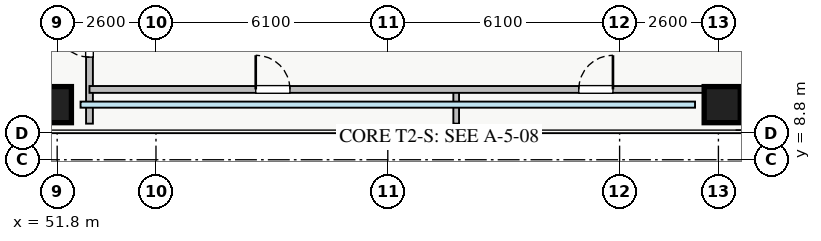
"""IFC4 building model, lengths in metres.
Left out: names, types, materials, properties, quantities, classifications, styles, units other than length and angle.
Written with IfcOpenShell. Run it as: python <this file> out.ifc"""

import sys

from ifc_helpers import new_model, si_unit, direction, frame, frame_2d, origin, origin_2d, place, context, subcontext, project, spatial, rectangle, extrude, source, transform, mapped, element, fill, save


model = new_model("IFC4")
c1 = context("Model", 3, precision=1e-05, world=origin(), true_north=direction((0.0, 1.0)))
c2 = subcontext(c1, "Body", "Model", "MODEL_VIEW")
j1 = project(units=[si_unit("LENGTHUNIT", "METRE"), si_unit("PLANEANGLEUNIT", "RADIAN")], contexts=[c1])
p1 = place(None, origin())
s1 = spatial("IfcSite", under=j1, at=p1, CompositionType="ELEMENT")
p2 = place(p1, origin())
s2 = spatial("IfcBuilding", under=s1, at=p2, CompositionType="ELEMENT")
p3 = place(p2, frame((0.0, 0.0, 39.25)))
s3 = spatial("IfcBuildingStorey", under=s2, at=p3, CompositionType="ELEMENT", Elevation=39.25)
m1 = source(origin(), c2, "Body", "SweptSolid", [
    extrude(rectangle(XDim=0.95, YDim=0.95, at=origin_2d()), origin(), (0.0, 0.0, 1.0), 3.25),
])
for number, where, z_axis, x_axis in (
    (1, (51.7, 10.25, 0.0), (0.0, 0.0, 1.0), (1.0, 0.0, 0.0)),
    (2, (69.3, 10.25, 0.0), (0.0, 0.0, 1.0), (1.0, 0.0, 0.0)),
):
    element("IfcColumn", number, at=place(p3, frame(where, z_axis=z_axis, x_axis=x_axis)), inside=s3, PredefinedType="COLUMN", context=c2, shape_type="MappedRepresentation", body=[
        mapped(m1, transform((0.0, 0.0, 0.0), x_axis=(1.0, 0.0, 0.0), y_axis=(0.0, 1.0, 0.0), z_axis=(0.0, 0.0, 1.0), scale=1.0)),
    ])
p4 = place(p3, frame((52.65, 9.75, 0.0), z_axis=(0.0, 0.0, 1.0), x_axis=(0.0, 1.0, 0.0)))
e3 = element("IfcWall", 3, at=p4, inside=s3, PredefinedType="PARTITIONING", context=c2, shape_type="SweptSolid", body=[
    extrude(rectangle(XDim=26.5, YDim=0.18, at=frame_2d((13.25, 0.0))), origin(), (0.0, 0.0, 1.0), 3.07),
])
p5 = place(p4, frame((23.85, 0.0, 0.0)))
e4 = element("IfcOpeningElement", 4, at=p5, cuts=e3, PredefinedType="OPENING", context=c2, shape_type="SweptSolid", body=[
    extrude(rectangle(XDim=0.9, YDim=2.05, at=frame_2d((0.45, 1.025))), frame((0.0, 0.1, 0.0), z_axis=(0.0, -1.0, 0.0), x_axis=(1.0, 0.0, 0.0)), (0.0, 0.0, 1.0), 0.2),
])
p6 = place(p4, frame((1.75, 0.0, 0.0)))
e5 = element("IfcOpeningElement", 5, at=p6, cuts=e3, PredefinedType="OPENING", context=c2, shape_type="SweptSolid", body=[
    extrude(rectangle(XDim=0.9, YDim=2.05, at=frame_2d((0.45, 1.025))), frame((0.0, 0.1, 0.0), z_axis=(0.0, -1.0, 0.0), x_axis=(1.0, 0.0, 0.0)), (0.0, 0.0, 1.0), 0.2),
])
p7 = place(p4, frame((7.015, 0.0, 0.0)))
e6 = element("IfcOpeningElement", 6, at=p7, cuts=e3, PredefinedType="OPENING", context=c2, shape_type="SweptSolid", body=[
    extrude(rectangle(XDim=1.0, YDim=2.05, at=frame_2d((0.5, 1.025))), frame((0.0, 0.1, 0.0), z_axis=(0.0, -1.0, 0.0), x_axis=(1.0, 0.0, 0.0)), (0.0, 0.0, 1.0), 0.2),
])
p8 = place(p4, frame((15.995, 0.0, 0.0)))
e7 = element("IfcOpeningElement", 7, at=p8, cuts=e3, PredefinedType="OPENING", context=c2, shape_type="SweptSolid", body=[
    extrude(rectangle(XDim=1.0, YDim=2.05, at=frame_2d((0.5, 1.025))), frame((0.0, 0.1, 0.0), z_axis=(0.0, -1.0, 0.0), x_axis=(1.0, 0.0, 0.0)), (0.0, 0.0, 1.0), 0.2),
])
for number, where, z_axis, x_axis in (
    (8, (62.3, 9.75, 0.0), (0.0, 0.0, 1.0), (0.0, 1.0, 0.0)),
    (9, (69.65, 9.75, 0.0), (0.0, 0.0, 1.0), (0.0, 1.0, 0.0)),
):
    element("IfcWall", number, at=place(p3, frame(where, z_axis=z_axis, x_axis=x_axis)), inside=s3, PredefinedType="PARTITIONING", context=c2, shape_type="SweptSolid", body=[
        extrude(rectangle(XDim=0.9, YDim=0.15, at=frame_2d((0.45, 0.0))), origin(), (0.0, 0.0, 1.0), 3.07),
    ])
p9 = place(p3, frame((52.65, 10.65, 0.0), z_axis=(0.0, 0.0, 1.0), x_axis=(1.0, 0.0, 0.0)))
e10 = element("IfcWall", 10, at=p9, inside=s3, PredefinedType="PARTITIONING", context=c2, shape_type="SweptSolid", body=[
    extrude(rectangle(XDim=17.0, YDim=0.18, at=frame_2d((8.5, 0.0))), origin(), (0.0, 0.0, 1.0), 3.07),
])
p10 = place(p9, frame((4.375, 0.0, 0.0)))
e11 = element("IfcOpeningElement", 11, at=p10, cuts=e10, PredefinedType="OPENING", context=c2, shape_type="SweptSolid", body=[
    extrude(rectangle(XDim=0.9, YDim=2.05, at=frame_2d((0.45, 1.025))), frame((0.0, 0.1, 0.0), z_axis=(0.0, -1.0, 0.0), x_axis=(1.0, 0.0, 0.0)), (0.0, 0.0, 1.0), 0.2),
])
p11 = place(p9, frame((12.875, 0.0, 0.0)))
e12 = element("IfcOpeningElement", 12, at=p11, cuts=e10, PredefinedType="OPENING", context=c2, shape_type="SweptSolid", body=[
    extrude(rectangle(XDim=0.9, YDim=2.05, at=frame_2d((0.45, 1.025))), frame((0.0, 0.1, 0.0), z_axis=(0.0, -1.0, 0.0), x_axis=(1.0, 0.0, 0.0)), (0.0, 0.0, 1.0), 0.2),
])
m2 = source(origin(), c2, "Body", "SweptSolid", [
    extrude(rectangle(XDim=0.9, YDim=2.05, at=frame_2d((0.45, 1.025))), frame((0.0, 0.025, 0.0), z_axis=(0.0, -1.0, 0.0), x_axis=(1.0, 0.0, 0.0)), (0.0, 0.0, 1.0), 0.05),
])
p12 = place(p6, origin())
e13 = element("IfcDoor", 13, at=p12, inside=s3, OperationType="SINGLE_SWING_RIGHT", PredefinedType="DOOR", context=c2, shape_type="MappedRepresentation", body=[
    mapped(m2, transform((0.0, 0.0, 0.0), x_axis=(1.0, 0.0, 0.0), y_axis=(0.0, 1.0, 0.0), z_axis=(0.0, 0.0, 1.0), scale=1.0)),
])
fill(e5, e13)
p13 = place(p10, origin())
e14 = element("IfcDoor", 14, at=p13, inside=s3, OperationType="SINGLE_SWING_LEFT", PredefinedType="DOOR", context=c2, shape_type="MappedRepresentation", body=[
    mapped(m2, transform((0.0, 0.0, 0.0), x_axis=(1.0, 0.0, 0.0), y_axis=(0.0, 1.0, 0.0), z_axis=(0.0, 0.0, 1.0), scale=1.0)),
])
fill(e11, e14)
p14 = place(p11, origin())
e15 = element("IfcDoor", 15, at=p14, inside=s3, OperationType="SINGLE_SWING_RIGHT", PredefinedType="DOOR", context=c2, shape_type="MappedRepresentation", body=[
    mapped(m2, transform((0.0, 0.0, 0.0), x_axis=(1.0, 0.0, 0.0), y_axis=(0.0, 1.0, 0.0), z_axis=(0.0, 0.0, 1.0), scale=1.0)),
])
fill(e12, e15)
save(model, sys.argv[1])
